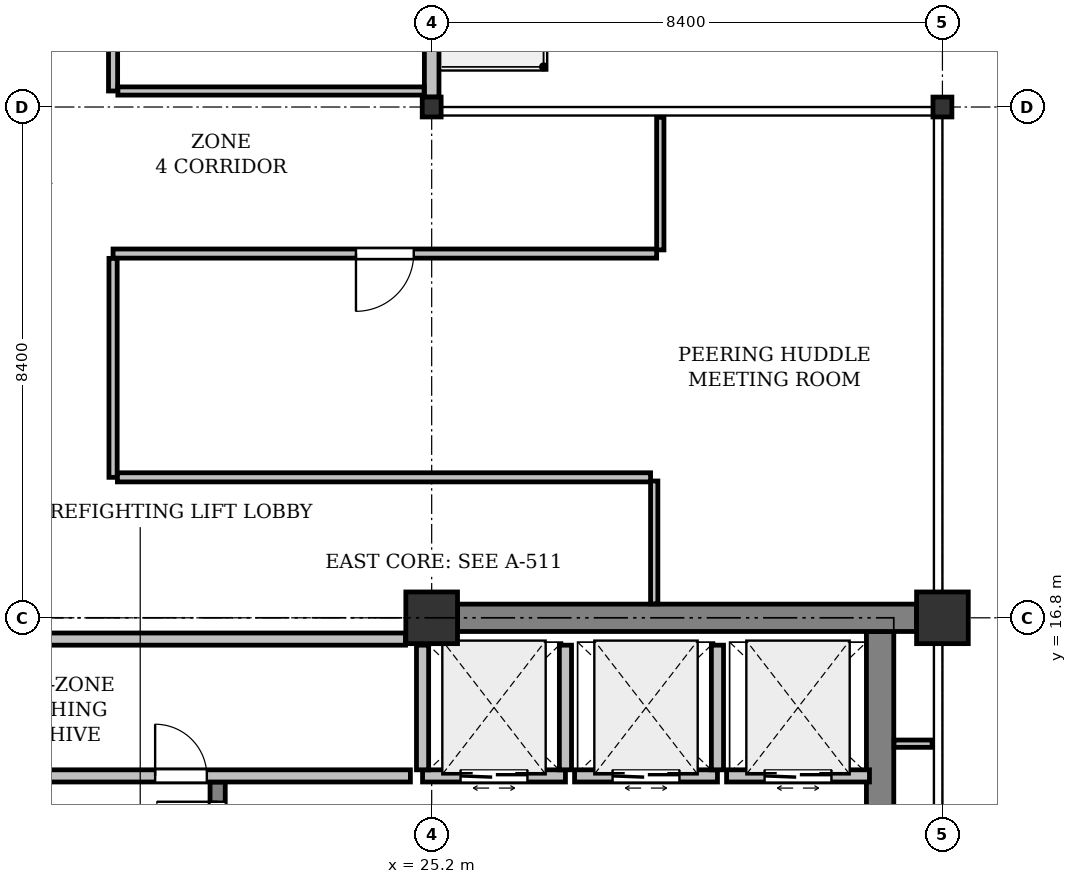
"""IFC4 building model, lengths in metres.
Left out: names, types, materials, properties, quantities, classifications, styles, units other than length and angle.
Written with IfcOpenShell. Run it as: python <this file> out.ifc"""

import sys

from ifc_helpers import new_model, si_unit, direction, frame, frame_2d, origin, origin_2d, place, context, subcontext, project, spatial, rectangle, i_section, extrude, element, fill, save


model = new_model("IFC4")
c1 = context("Model", 3, precision=1e-05, world=origin(), true_north=direction((0.0, 1.0)))
c2 = subcontext(c1, "Body", "Model", "MODEL_VIEW")
j1 = project(units=[si_unit("LENGTHUNIT", "METRE"), si_unit("PLANEANGLEUNIT", "RADIAN")], contexts=[c1])
p1 = place(None, origin())
s1 = spatial("IfcSite", under=j1, at=p1, CompositionType="ELEMENT")
p2 = place(p1, origin())
s2 = spatial("IfcBuilding", under=s1, at=p2, CompositionType="ELEMENT")
p3 = place(p2, frame((0.0, 0.0, 302.2)))
s3 = spatial("IfcBuildingStorey", under=s2, at=p3, CompositionType="ELEMENT", Elevation=302.2)
p4 = place(p3, frame((25.2, 16.8, 0.0), z_axis=(0.0, 0.0, 1.0), x_axis=(1.0, 0.0, 0.0)))
e1 = element("IfcColumn", 1, at=p4, inside=s3, PredefinedType="COLUMN", context=c2, shape_type="SweptSolid", body=[
    extrude(rectangle(XDim=0.85, YDim=0.85, at=origin_2d()), origin(), (0.0, 0.0, 1.0), 4.0),
])
p5 = place(p3, frame((25.2, 25.2, 0.0), z_axis=(0.0, 0.0, 1.0), x_axis=(1.0, 0.0, 0.0)))
e2 = element("IfcColumn", 2, at=p5, inside=s3, PredefinedType="COLUMN", context=c2, shape_type="SweptSolid", body=[
    extrude(i_section(OverallWidth=0.311, OverallDepth=0.327, WebThickness=0.016, FlangeThickness=0.025, FilletRadius=0.017, at=origin_2d()), origin(), (0.0, 0.0, 1.0), 4.0),
])
p6 = place(p3, frame((33.6, 16.8, 0.0), z_axis=(0.0, 0.0, 1.0), x_axis=(1.0, 0.0, 0.0)))
e3 = element("IfcColumn", 3, at=p6, inside=s3, PredefinedType="COLUMN", context=c2, shape_type="SweptSolid", body=[
    extrude(rectangle(XDim=0.85, YDim=0.85, at=origin_2d()), origin(), (0.0, 0.0, 1.0), 4.0),
])
p7 = place(p3, frame((33.6, 25.2, 0.0), z_axis=(0.0, 0.0, 1.0), x_axis=(1.0, 0.0, 0.0)))
e4 = element("IfcColumn", 4, at=p7, inside=s3, PredefinedType="COLUMN", context=c2, shape_type="SweptSolid", body=[
    extrude(i_section(OverallWidth=0.311, OverallDepth=0.327, WebThickness=0.016, FlangeThickness=0.025, FilletRadius=0.017, at=origin_2d()), origin(), (0.0, 0.0, 1.0), 4.0),
])
p8 = place(p3, frame((25.2, 33.437, 0.0), z_axis=(0.0, 0.0, 1.0), x_axis=(0.0, -1.0, 0.0)))
e5 = element("IfcWall", 5, at=p8, inside=s3, PredefinedType="STANDARD", context=c2, shape_type="SweptSolid", body=[
    extrude(rectangle(XDim=8.073, YDim=0.24, at=frame_2d((4.037, 0.0))), origin(), (0.0, 0.0, 1.0), 3.475),
])
p9 = place(p8, frame((0.3, 0.0, 0.0)))
e6 = element("IfcOpeningElement", 6, at=p9, cuts=e5, PredefinedType="OPENING", context=c2, shape_type="SweptSolid", body=[
    extrude(rectangle(XDim=1.2, YDim=2.2, at=frame_2d((0.6, 1.1))), frame((0.0, 0.13, 0.0), z_axis=(0.0, -1.0, 0.0), x_axis=(1.0, 0.0, 0.0)), (0.0, 0.0, 1.0), 0.26),
])
p10 = place(p8, frame((3.132, 0.0, 0.9)))
e7 = element("IfcOpeningElement", 7, at=p10, cuts=e5, PredefinedType="OPENING", context=c2, shape_type="SweptSolid", body=[
    extrude(rectangle(XDim=1.8, YDim=1.6, at=frame_2d((0.9, 0.8))), frame((0.0, 0.13, 0.0), z_axis=(0.0, -1.0, 0.0), x_axis=(1.0, 0.0, 0.0)), (0.0, 0.0, 1.0), 0.26),
])
p11 = place(p3, frame((32.575, 8.625, 0.0), z_axis=(0.0, 0.0, 1.0), x_axis=(0.0, 1.0, 0.0)))
e8 = element("IfcWall", 8, at=p11, inside=s3, PredefinedType="SHEAR", context=c2, shape_type="SweptSolid", body=[
    extrude(rectangle(XDim=7.95, YDim=0.45, at=frame_2d((3.975, 0.0))), origin(), (0.0, 0.0, 1.0), 3.725),
])
p12 = place(p3, frame((25.625, 16.8, 0.0), z_axis=(0.0, 0.0, 1.0), x_axis=(1.0, 0.0, 0.0)))
e9 = element("IfcWall", 9, at=p12, inside=s3, PredefinedType="SHEAR", context=c2, shape_type="SweptSolid", body=[
    extrude(rectangle(XDim=7.55, YDim=0.45, at=frame_2d((3.775, 0.0))), origin(), (0.0, 0.0, 1.0), 3.725),
])
p13 = place(p3, frame((21.68, 12.45, 0.0), z_axis=(0.0, 0.0, 1.0), x_axis=(0.0, 1.0, 0.0)))
e10 = element("IfcWall", 10, at=p13, inside=s3, PredefinedType="SHEAR", context=c2, shape_type="SweptSolid", body=[
    extrude(rectangle(XDim=1.65, YDim=0.25, at=frame_2d((0.825, 0.0))), origin(), (0.0, 0.0, 1.0), 3.725),
])
p14 = place(p13, frame((0.325, 0.0, 0.0)))
e11 = element("IfcOpeningElement", 11, at=p14, cuts=e10, PredefinedType="OPENING", context=c2, shape_type="SweptSolid", body=[
    extrude(rectangle(XDim=1.0, YDim=2.15, at=frame_2d((0.5, 1.075))), frame((0.0, 0.135, 0.0), z_axis=(0.0, -1.0, 0.0), x_axis=(1.0, 0.0, 0.0)), (0.0, 0.0, 1.0), 0.27),
])
p15 = place(p3, frame((25.05, 14.2, 0.0), z_axis=(0.0, 0.0, 1.0), x_axis=(1.0, 0.0, 0.0)))
e12 = element("IfcWall", 12, at=p15, inside=s3, PredefinedType="PARTITIONING", context=c2, shape_type="SweptSolid", body=[
    extrude(rectangle(XDim=2.35, YDim=0.2, at=frame_2d((1.175, 0.0))), origin(), (0.0, 0.0, 1.0), 3.725),
])
p16 = place(p15, frame((0.625, 0.0, 0.0)))
e13 = element("IfcOpeningElement", 13, at=p16, cuts=e12, PredefinedType="OPENING", context=c2, shape_type="SweptSolid", body=[
    extrude(rectangle(XDim=1.1, YDim=2.2, at=frame_2d((0.55, 1.1))), frame((0.0, 0.11, 0.0), z_axis=(0.0, -1.0, 0.0), x_axis=(1.0, 0.0, 0.0)), (0.0, 0.0, 1.0), 0.22),
])
for number, where, z_axis, x_axis in (
    (14, (27.4, 14.3, 0.0), (0.0, 0.0, 1.0), (0.0, 1.0, 0.0)),
    (15, (25.05, 14.3, 0.0), (0.0, 0.0, 1.0), (0.0, 1.0, 0.0)),
):
    element("IfcWall", number, at=place(p3, frame(where, z_axis=z_axis, x_axis=x_axis)), inside=s3, PredefinedType="PARTITIONING", context=c2, shape_type="SweptSolid", body=[
        extrude(rectangle(XDim=2.05, YDim=0.2, at=frame_2d((1.025, 0.0))), origin(), (0.0, 0.0, 1.0), 3.725),
    ])
p17 = place(p3, frame((27.55, 14.2, 0.0), z_axis=(0.0, 0.0, 1.0), x_axis=(1.0, 0.0, 0.0)))
e16 = element("IfcWall", 16, at=p17, inside=s3, PredefinedType="PARTITIONING", context=c2, shape_type="SweptSolid", body=[
    extrude(rectangle(XDim=2.35, YDim=0.2, at=frame_2d((1.175, 0.0))), origin(), (0.0, 0.0, 1.0), 3.725),
])
p18 = place(p17, frame((0.625, 0.0, 0.0)))
e17 = element("IfcOpeningElement", 17, at=p18, cuts=e16, PredefinedType="OPENING", context=c2, shape_type="SweptSolid", body=[
    extrude(rectangle(XDim=1.1, YDim=2.2, at=frame_2d((0.55, 1.1))), frame((0.0, 0.11, 0.0), z_axis=(0.0, -1.0, 0.0), x_axis=(1.0, 0.0, 0.0)), (0.0, 0.0, 1.0), 0.22),
])
p19 = place(p3, frame((29.9, 14.3, 0.0), z_axis=(0.0, 0.0, 1.0), x_axis=(0.0, 1.0, 0.0)))
e18 = element("IfcWall", 18, at=p19, inside=s3, PredefinedType="PARTITIONING", context=c2, shape_type="SweptSolid", body=[
    extrude(rectangle(XDim=2.05, YDim=0.2, at=frame_2d((1.025, 0.0))), origin(), (0.0, 0.0, 1.0), 3.725),
])
p20 = place(p3, frame((30.05, 14.2, 0.0), z_axis=(0.0, 0.0, 1.0), x_axis=(1.0, 0.0, 0.0)))
e19 = element("IfcWall", 19, at=p20, inside=s3, PredefinedType="PARTITIONING", context=c2, shape_type="SweptSolid", body=[
    extrude(rectangle(XDim=2.35, YDim=0.2, at=frame_2d((1.175, 0.0))), origin(), (0.0, 0.0, 1.0), 3.725),
])
p21 = place(p20, frame((0.625, 0.0, 0.0)))
e20 = element("IfcOpeningElement", 20, at=p21, cuts=e19, PredefinedType="OPENING", context=c2, shape_type="SweptSolid", body=[
    extrude(rectangle(XDim=1.1, YDim=2.2, at=frame_2d((0.55, 1.1))), frame((0.0, 0.11, 0.0), z_axis=(0.0, -1.0, 0.0), x_axis=(1.0, 0.0, 0.0)), (0.0, 0.0, 1.0), 0.22),
])
p22 = place(p3, frame((24.77, 16.45, 0.0), z_axis=(0.0, 0.0, 1.0), x_axis=(-1.0, 0.0, 0.0)))
e21 = element("IfcWall", 21, at=p22, inside=s3, PredefinedType="PARTITIONING", context=c2, shape_type="SweptSolid", body=[
    extrude(rectangle(XDim=7.54, YDim=0.2, at=frame_2d((3.77, 0.0))), origin(), (0.0, 0.0, 1.0), 3.725),
])
p23 = place(p3, frame((17.304, 14.2, 0.0), z_axis=(0.0, 0.0, 1.0), x_axis=(1.0, 0.0, 0.0)))
e22 = element("IfcWall", 22, at=p23, inside=s3, PredefinedType="PARTITIONING", context=c2, shape_type="SweptSolid", body=[
    extrude(rectangle(XDim=7.546, YDim=0.2, at=frame_2d((3.773, 0.0))), origin(), (0.0, 0.0, 1.0), 3.725),
])
p24 = place(p23, frame((3.348, 0.0, 0.0)))
e23 = element("IfcOpeningElement", 23, at=p24, cuts=e22, PredefinedType="OPENING", context=c2, shape_type="SweptSolid", body=[
    extrude(rectangle(XDim=0.85, YDim=2.15, at=frame_2d((0.425, 1.075))), frame((0.0, 0.11, 0.0), z_axis=(0.0, -1.0, 0.0), x_axis=(1.0, 0.0, 0.0)), (0.0, 0.0, 1.0), 0.22),
])
p25 = place(p3, frame((28.86, 19.05, 0.0), z_axis=(0.0, 0.0, 1.0), x_axis=(0.0, -1.0, 0.0)))
e24 = element("IfcWall", 24, at=p25, inside=s3, PredefinedType="PARTITIONING", context=c2, shape_type="SweptSolid", body=[
    extrude(rectangle(XDim=2.021, YDim=0.12, at=frame_2d((1.01, 0.0))), origin(), (0.0, 0.0, 1.0), 3.725),
])
p26 = place(p3, frame((32.804, 14.73, 0.0), z_axis=(0.0, 0.0, 1.0), x_axis=(1.0, 0.0, 0.0)))
e25 = element("IfcWall", 25, at=p26, inside=s3, PredefinedType="PARTITIONING", context=c2, shape_type="SweptSolid", body=[
    extrude(rectangle(XDim=0.627, YDim=0.12, at=frame_2d((0.313, 0.0))), origin(), (0.0, 0.0, 1.0), 3.725),
])
p27 = place(p3, frame((28.96, 25.031, 0.0), z_axis=(0.0, 0.0, 1.0), x_axis=(0.0, -1.0, 0.0)))
e26 = element("IfcWall", 26, at=p27, inside=s3, PredefinedType="PARTITIONING", context=c2, shape_type="SweptSolid", body=[
    extrude(rectangle(XDim=2.181, YDim=0.12, at=frame_2d((1.09, 0.0))), origin(), (0.0, 0.0, 1.0), 3.725),
])
p28 = place(p3, frame((28.9, 22.79, 0.0), z_axis=(0.0, 0.0, 1.0), x_axis=(-1.0, 0.0, 0.0)))
e27 = element("IfcWall", 27, at=p28, inside=s3, PredefinedType="PARTITIONING", context=c2, shape_type="SweptSolid", body=[
    extrude(rectangle(XDim=8.94, YDim=0.15, at=frame_2d((4.47, 0.0))), origin(), (0.0, 0.0, 1.0), 3.319),
])
p29 = place(p28, frame((3.995, 0.0, 0.0)))
e28 = element("IfcOpeningElement", 28, at=p29, cuts=e27, PredefinedType="OPENING", context=c2, shape_type="SweptSolid", body=[
    extrude(rectangle(XDim=0.95, YDim=2.15, at=frame_2d((0.475, 1.075))), frame((0.0, 0.085, 0.0), z_axis=(0.0, -1.0, 0.0), x_axis=(1.0, 0.0, 0.0)), (0.0, 0.0, 1.0), 0.17),
])
p30 = place(p3, frame((19.96, 22.711, 0.0), z_axis=(0.0, 0.0, 1.0), x_axis=(0.0, -1.0, 0.0)))
e29 = element("IfcWall", 29, at=p30, inside=s3, PredefinedType="PARTITIONING", context=c2, shape_type="SweptSolid", body=[
    extrude(rectangle(XDim=3.601, YDim=0.135, at=frame_2d((1.8, 0.0))), origin(), (0.0, 0.0, 1.0), 3.725),
])
p31 = place(p3, frame((20.031, 19.11, 0.0), z_axis=(0.0, 0.0, 1.0), x_axis=(1.0, 0.0, 0.0)))
e30 = element("IfcWall", 30, at=p31, inside=s3, PredefinedType="PARTITIONING", context=c2, shape_type="SweptSolid", body=[
    extrude(rectangle(XDim=8.769, YDim=0.15, at=frame_2d((4.384, 0.0))), origin(), (0.0, 0.0, 1.0), 3.319),
])
p32 = place(p3, frame((19.96, 37.4, 0.0), z_axis=(0.0, 0.0, 1.0), x_axis=(0.0, -1.0, 0.0)))
e31 = element("IfcWall", 31, at=p32, inside=s3, PredefinedType="PARTITIONING", context=c2, shape_type="SweptSolid", body=[
    extrude(rectangle(XDim=11.937, YDim=0.15, at=frame_2d((5.968, 0.0))), origin(), (0.0, 0.0, 1.0), 3.271),
])
p33 = place(p32, frame((5.493, 0.0, 0.0)))
e32 = element("IfcOpeningElement", 32, at=p33, cuts=e31, PredefinedType="OPENING", context=c2, shape_type="SweptSolid", body=[
    extrude(rectangle(XDim=0.95, YDim=2.15, at=frame_2d((0.475, 1.075))), frame((0.0, 0.085, 0.0), z_axis=(0.0, -1.0, 0.0), x_axis=(1.0, 0.0, 0.0)), (0.0, 0.0, 1.0), 0.17),
])
p34 = place(p3, frame((20.039, 25.463, 0.0), z_axis=(0.0, 0.0, 1.0), x_axis=(1.0, 0.0, 0.0)))
e33 = element("IfcWall", 33, at=p34, inside=s3, PredefinedType="PARTITIONING", context=c2, shape_type="SweptSolid", body=[
    extrude(rectangle(XDim=5.037, YDim=0.135, at=frame_2d((2.519, 0.0))), origin(), (0.0, 0.0, 1.0), 3.421),
])
p35 = place(p14, origin())
e34 = element("IfcDoor", 34, at=p35, inside=s3, OperationType="SINGLE_SWING_RIGHT", PredefinedType="DOOR", context=c2, shape_type="SweptSolid", body=[
    extrude(rectangle(XDim=1.0, YDim=2.15, at=frame_2d((0.5, 1.075))), frame((0.0, 0.025, 0.0), z_axis=(0.0, -1.0, 0.0), x_axis=(1.0, 0.0, 0.0)), (0.0, 0.0, 1.0), 0.05),
])
fill(e11, e34)
p36 = place(p16, origin())
e35 = element("IfcDoor", 35, at=p36, inside=s3, OperationType="DOUBLE_DOOR_SLIDING", PredefinedType="DOOR", context=c2, shape_type="SweptSolid", body=[
    extrude(rectangle(XDim=1.1, YDim=2.2, at=frame_2d((0.55, 1.1))), frame((0.0, 0.025, 0.0), z_axis=(0.0, -1.0, 0.0), x_axis=(1.0, 0.0, 0.0)), (0.0, 0.0, 1.0), 0.05),
])
fill(e13, e35)
p37 = place(p18, origin())
e36 = element("IfcDoor", 36, at=p37, inside=s3, OperationType="DOUBLE_DOOR_SLIDING", PredefinedType="DOOR", context=c2, shape_type="SweptSolid", body=[
    extrude(rectangle(XDim=1.1, YDim=2.2, at=frame_2d((0.55, 1.1))), frame((0.0, 0.025, 0.0), z_axis=(0.0, -1.0, 0.0), x_axis=(1.0, 0.0, 0.0)), (0.0, 0.0, 1.0), 0.05),
])
fill(e17, e36)
p38 = place(p21, origin())
e37 = element("IfcDoor", 37, at=p38, inside=s3, OperationType="DOUBLE_DOOR_SLIDING", PredefinedType="DOOR", context=c2, shape_type="SweptSolid", body=[
    extrude(rectangle(XDim=1.1, YDim=2.2, at=frame_2d((0.55, 1.1))), frame((0.0, 0.025, 0.0), z_axis=(0.0, -1.0, 0.0), x_axis=(1.0, 0.0, 0.0)), (0.0, 0.0, 1.0), 0.05),
])
fill(e20, e37)
p39 = place(p24, origin())
e38 = element("IfcDoor", 38, at=p39, inside=s3, OperationType="SINGLE_SWING_LEFT", PredefinedType="DOOR", context=c2, shape_type="SweptSolid", body=[
    extrude(rectangle(XDim=0.85, YDim=2.15, at=frame_2d((0.425, 1.075))), frame((0.0, 0.025, 0.0), z_axis=(0.0, -1.0, 0.0), x_axis=(1.0, 0.0, 0.0)), (0.0, 0.0, 1.0), 0.05),
])
fill(e23, e38)
p40 = place(p29, origin())
e39 = element("IfcDoor", 39, at=p40, inside=s3, OperationType="SINGLE_SWING_RIGHT", PredefinedType="DOOR", context=c2, shape_type="SweptSolid", body=[
    extrude(rectangle(XDim=0.95, YDim=2.15, at=frame_2d((0.475, 1.075))), frame((0.0, 0.025, 0.0), z_axis=(0.0, -1.0, 0.0), x_axis=(1.0, 0.0, 0.0)), (0.0, 0.0, 1.0), 0.05),
])
fill(e28, e39)
save(model, sys.argv[1])
